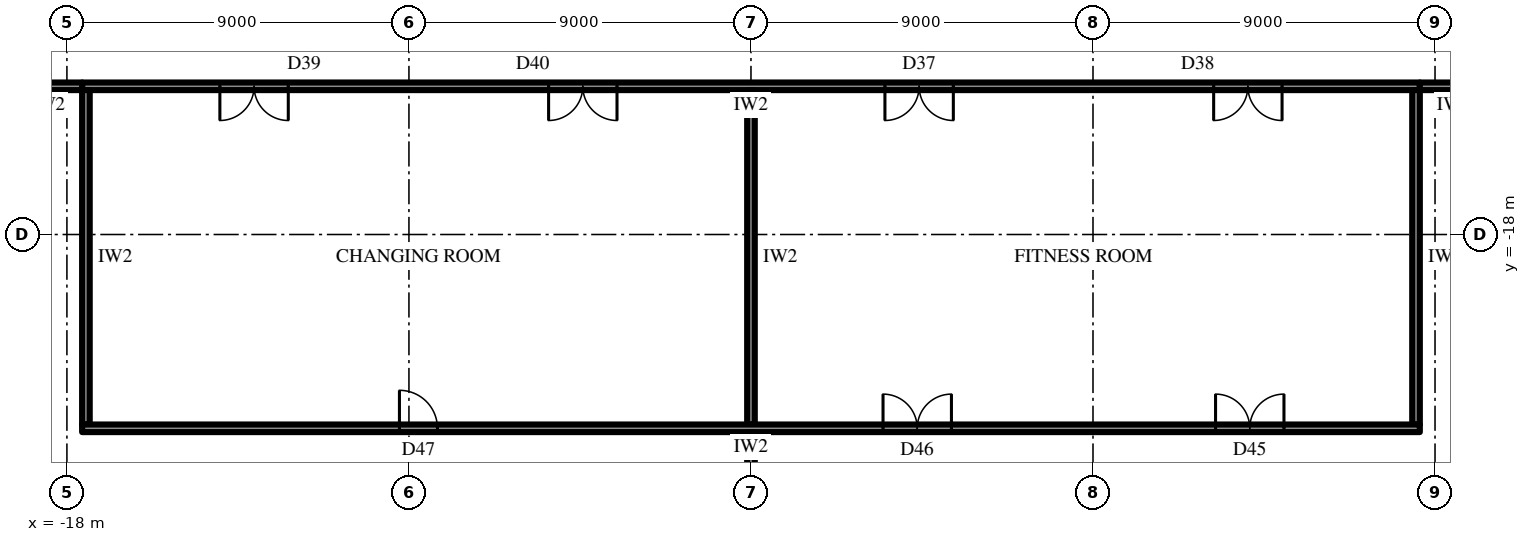
"""IFC4 building model, lengths in metres.
Left out: names, types, materials, properties, quantities, classifications, styles, units other than length and angle.
Written with IfcOpenShell. Run it as: python <this file> out.ifc"""

import sys

from ifc_helpers import new_model, si_unit, direction, frame, frame_2d, origin, place, context, subcontext, project, spatial, rectangle, extrude, element, fill, save


model = new_model("IFC4")
c1 = context("Model", 3, precision=1e-05, world=origin(), true_north=direction((0.0, 1.0)))
c2 = subcontext(c1, "Body", "Model", "MODEL_VIEW")
j1 = project(units=[si_unit("LENGTHUNIT", "METRE"), si_unit("PLANEANGLEUNIT", "RADIAN")], contexts=[c1])
p1 = place(None, origin())
s1 = spatial("IfcSite", under=j1, at=p1, CompositionType="ELEMENT")
p2 = place(p1, origin())
s2 = spatial("IfcBuilding", under=s1, at=p2, CompositionType="ELEMENT")
p3 = place(p2, frame((0.0, 0.0, 18.5)))
s3 = spatial("IfcBuildingStorey", under=s2, at=p3, CompositionType="ELEMENT", Elevation=18.5)
p4 = place(p3, frame((17.6, -14.1, 0.0), z_axis=(0.0, 0.0, 1.0), x_axis=(-1.0, 0.0, 0.0)))
e1 = element("IfcWall", 1, at=p4, inside=s3, PredefinedType="PARTITIONING", context=c2, shape_type="SweptSolid", body=[
    extrude(rectangle(XDim=35.2, YDim=0.2, at=frame_2d((17.6, 0.0))), origin(), (0.0, 0.0, 1.0), 4.65),
])
p5 = place(p4, frame((12.275, 0.0, 0.0)))
e2 = element("IfcOpeningElement", 2, at=p5, cuts=e1, PredefinedType="OPENING", context=c2, shape_type="SweptSolid", body=[
    extrude(rectangle(XDim=1.8, YDim=2.4, at=frame_2d((0.9, 1.2))), frame((0.0, 0.11, 0.0), z_axis=(0.0, -1.0, 0.0), x_axis=(1.0, 0.0, 0.0)), (0.0, 0.0, 1.0), 0.22),
])
p6 = place(p4, frame((3.625, 0.0, 0.0)))
e3 = element("IfcOpeningElement", 3, at=p6, cuts=e1, PredefinedType="OPENING", context=c2, shape_type="SweptSolid", body=[
    extrude(rectangle(XDim=1.8, YDim=2.4, at=frame_2d((0.9, 1.2))), frame((0.0, 0.11, 0.0), z_axis=(0.0, -1.0, 0.0), x_axis=(1.0, 0.0, 0.0)), (0.0, 0.0, 1.0), 0.22),
])
p7 = place(p4, frame((29.775, 0.0, 0.0)))
e4 = element("IfcOpeningElement", 4, at=p7, cuts=e1, PredefinedType="OPENING", context=c2, shape_type="SweptSolid", body=[
    extrude(rectangle(XDim=1.8, YDim=2.4, at=frame_2d((0.9, 1.2))), frame((0.0, 0.11, 0.0), z_axis=(0.0, -1.0, 0.0), x_axis=(1.0, 0.0, 0.0)), (0.0, 0.0, 1.0), 0.22),
])
p8 = place(p4, frame((21.125, 0.0, 0.0)))
e5 = element("IfcOpeningElement", 5, at=p8, cuts=e1, PredefinedType="OPENING", context=c2, shape_type="SweptSolid", body=[
    extrude(rectangle(XDim=1.8, YDim=2.4, at=frame_2d((0.9, 1.2))), frame((0.0, 0.11, 0.0), z_axis=(0.0, -1.0, 0.0), x_axis=(1.0, 0.0, 0.0)), (0.0, 0.0, 1.0), 0.22),
])
p9 = place(p3, frame((17.5, -14.2, 0.0), z_axis=(0.0, 0.0, 1.0), x_axis=(0.0, -1.0, 0.0)))
e6 = element("IfcWall", 6, at=p9, inside=s3, PredefinedType="PARTITIONING", context=c2, shape_type="SweptSolid", body=[
    extrude(rectangle(XDim=8.8, YDim=0.2, at=frame_2d((4.4, 0.0))), origin(), (0.0, 0.0, 1.0), 4.65),
])
p10 = place(p3, frame((0.0, -14.2, 0.0), z_axis=(0.0, 0.0, 1.0), x_axis=(0.0, -1.0, 0.0)))
e7 = element("IfcWall", 7, at=p10, inside=s3, PredefinedType="PARTITIONING", context=c2, shape_type="SweptSolid", body=[
    extrude(rectangle(XDim=8.8, YDim=0.2, at=frame_2d((4.4, 0.0))), origin(), (0.0, 0.0, 1.0), 3.594),
])
p11 = place(p3, frame((-17.5, -14.2, 0.0), z_axis=(0.0, 0.0, 1.0), x_axis=(0.0, -1.0, 0.0)))
e8 = element("IfcWall", 8, at=p11, inside=s3, PredefinedType="PARTITIONING", context=c2, shape_type="SweptSolid", body=[
    extrude(rectangle(XDim=8.8, YDim=0.2, at=frame_2d((4.4, 0.0))), origin(), (0.0, 0.0, 1.0), 4.65),
])
p12 = place(p3, frame((17.6, -23.1, 0.0), z_axis=(0.0, 0.0, 1.0), x_axis=(-1.0, 0.0, 0.0)))
e9 = element("IfcWall", 9, at=p12, inside=s3, PredefinedType="PARTITIONING", context=c2, shape_type="SweptSolid", body=[
    extrude(rectangle(XDim=35.2, YDim=0.2, at=frame_2d((17.6, 0.0))), origin(), (0.0, 0.0, 1.0), 4.65),
])
p13 = place(p12, frame((3.575, 0.0, 0.0)))
e10 = element("IfcOpeningElement", 10, at=p13, cuts=e9, PredefinedType="OPENING", context=c2, shape_type="SweptSolid", body=[
    extrude(rectangle(XDim=1.8, YDim=2.4, at=frame_2d((0.9, 1.2))), frame((0.0, 0.11, 0.0), z_axis=(0.0, -1.0, 0.0), x_axis=(1.0, 0.0, 0.0)), (0.0, 0.0, 1.0), 0.22),
])
p14 = place(p12, frame((12.325, 0.0, 0.0)))
e11 = element("IfcOpeningElement", 11, at=p14, cuts=e9, PredefinedType="OPENING", context=c2, shape_type="SweptSolid", body=[
    extrude(rectangle(XDim=1.8, YDim=2.4, at=frame_2d((0.9, 1.2))), frame((0.0, 0.11, 0.0), z_axis=(0.0, -1.0, 0.0), x_axis=(1.0, 0.0, 0.0)), (0.0, 0.0, 1.0), 0.22),
])
p15 = place(p12, frame((25.85, 0.0, 0.0)))
e12 = element("IfcOpeningElement", 12, at=p15, cuts=e9, PredefinedType="OPENING", context=c2, shape_type="SweptSolid", body=[
    extrude(rectangle(XDim=1.0, YDim=2.2, at=frame_2d((0.5, 1.1))), frame((0.0, 0.11, 0.0), z_axis=(0.0, -1.0, 0.0), x_axis=(1.0, 0.0, 0.0)), (0.0, 0.0, 1.0), 0.22),
])
for number, where, z_axis, x_axis in (
    (13, (-17.6, -14.1, 0.0), (0.0, 0.0, 1.0), (-1.0, 0.0, 0.0)),
    (14, (19.4, -14.1, 0.0), (0.0, 0.0, 1.0), (-1.0, 0.0, 0.0)),
):
    element("IfcWall", number, at=place(p3, frame(where, z_axis=z_axis, x_axis=x_axis)), inside=s3, PredefinedType="PARTITIONING", context=c2, shape_type="SweptSolid", body=[
        extrude(rectangle(XDim=1.8, YDim=0.2, at=frame_2d((0.9, 0.0))), origin(), (0.0, 0.0, 1.0), 4.65),
    ])
p16 = place(p3, frame((0.0, -23.2, 0.0), z_axis=(0.0, 0.0, 1.0), x_axis=(0.0, -1.0, 0.0)))
e15 = element("IfcWall", 15, at=p16, inside=s3, PredefinedType="PARTITIONING", context=c2, shape_type="SweptSolid", body=[
    extrude(rectangle(XDim=10.52, YDim=0.2, at=frame_2d((5.26, 0.0))), origin(), (0.0, 0.0, 1.0), 3.594),
])
p17 = place(p13, frame((1.8, 0.0, 0.0), z_axis=(0.0, 0.0, 1.0), x_axis=(-1.0, 0.0, 0.0)))
e16 = element("IfcDoor", 16, at=p17, inside=s3, OperationType="DOUBLE_DOOR_SINGLE_SWING", PredefinedType="DOOR", context=c2, shape_type="SweptSolid", body=[
    extrude(rectangle(XDim=1.8, YDim=2.4, at=frame_2d((0.9, 1.2))), frame((0.0, 0.025, 0.0), z_axis=(0.0, -1.0, 0.0), x_axis=(1.0, 0.0, 0.0)), (0.0, 0.0, 1.0), 0.05),
])
fill(e10, e16)
p18 = place(p14, frame((1.8, 0.0, 0.0), z_axis=(0.0, 0.0, 1.0), x_axis=(-1.0, 0.0, 0.0)))
e17 = element("IfcDoor", 17, at=p18, inside=s3, OperationType="DOUBLE_DOOR_SINGLE_SWING", PredefinedType="DOOR", context=c2, shape_type="SweptSolid", body=[
    extrude(rectangle(XDim=1.8, YDim=2.4, at=frame_2d((0.9, 1.2))), frame((0.0, 0.025, 0.0), z_axis=(0.0, -1.0, 0.0), x_axis=(1.0, 0.0, 0.0)), (0.0, 0.0, 1.0), 0.05),
])
fill(e11, e17)
p19 = place(p15, frame((1.0, 0.0, 0.0), z_axis=(0.0, 0.0, 1.0), x_axis=(-1.0, 0.0, 0.0)))
e18 = element("IfcDoor", 18, at=p19, inside=s3, OperationType="SINGLE_SWING_RIGHT", PredefinedType="DOOR", context=c2, shape_type="SweptSolid", body=[
    extrude(rectangle(XDim=1.0, YDim=2.2, at=frame_2d((0.5, 1.1))), frame((0.0, 0.025, 0.0), z_axis=(0.0, -1.0, 0.0), x_axis=(1.0, 0.0, 0.0)), (0.0, 0.0, 1.0), 0.05),
])
fill(e12, e18)
p20 = place(p5, origin())
e19 = element("IfcDoor", 19, at=p20, inside=s3, OperationType="DOUBLE_DOOR_SINGLE_SWING", PredefinedType="DOOR", context=c2, shape_type="SweptSolid", body=[
    extrude(rectangle(XDim=1.8, YDim=2.4, at=frame_2d((0.9, 1.2))), frame((0.0, 0.025, 0.0), z_axis=(0.0, -1.0, 0.0), x_axis=(1.0, 0.0, 0.0)), (0.0, 0.0, 1.0), 0.05),
])
fill(e2, e19)
p21 = place(p6, origin())
e20 = element("IfcDoor", 20, at=p21, inside=s3, OperationType="DOUBLE_DOOR_SINGLE_SWING", PredefinedType="DOOR", context=c2, shape_type="SweptSolid", body=[
    extrude(rectangle(XDim=1.8, YDim=2.4, at=frame_2d((0.9, 1.2))), frame((0.0, 0.025, 0.0), z_axis=(0.0, -1.0, 0.0), x_axis=(1.0, 0.0, 0.0)), (0.0, 0.0, 1.0), 0.05),
])
fill(e3, e20)
p22 = place(p7, origin())
e21 = element("IfcDoor", 21, at=p22, inside=s3, OperationType="DOUBLE_DOOR_SINGLE_SWING", PredefinedType="DOOR", context=c2, shape_type="SweptSolid", body=[
    extrude(rectangle(XDim=1.8, YDim=2.4, at=frame_2d((0.9, 1.2))), frame((0.0, 0.025, 0.0), z_axis=(0.0, -1.0, 0.0), x_axis=(1.0, 0.0, 0.0)), (0.0, 0.0, 1.0), 0.05),
])
fill(e4, e21)
p23 = place(p8, origin())
e22 = element("IfcDoor", 22, at=p23, inside=s3, OperationType="DOUBLE_DOOR_SINGLE_SWING", PredefinedType="DOOR", context=c2, shape_type="SweptSolid", body=[
    extrude(rectangle(XDim=1.8, YDim=2.4, at=frame_2d((0.9, 1.2))), frame((0.0, 0.025, 0.0), z_axis=(0.0, -1.0, 0.0), x_axis=(1.0, 0.0, 0.0)), (0.0, 0.0, 1.0), 0.05),
])
fill(e5, e22)
save(model, sys.argv[1])
